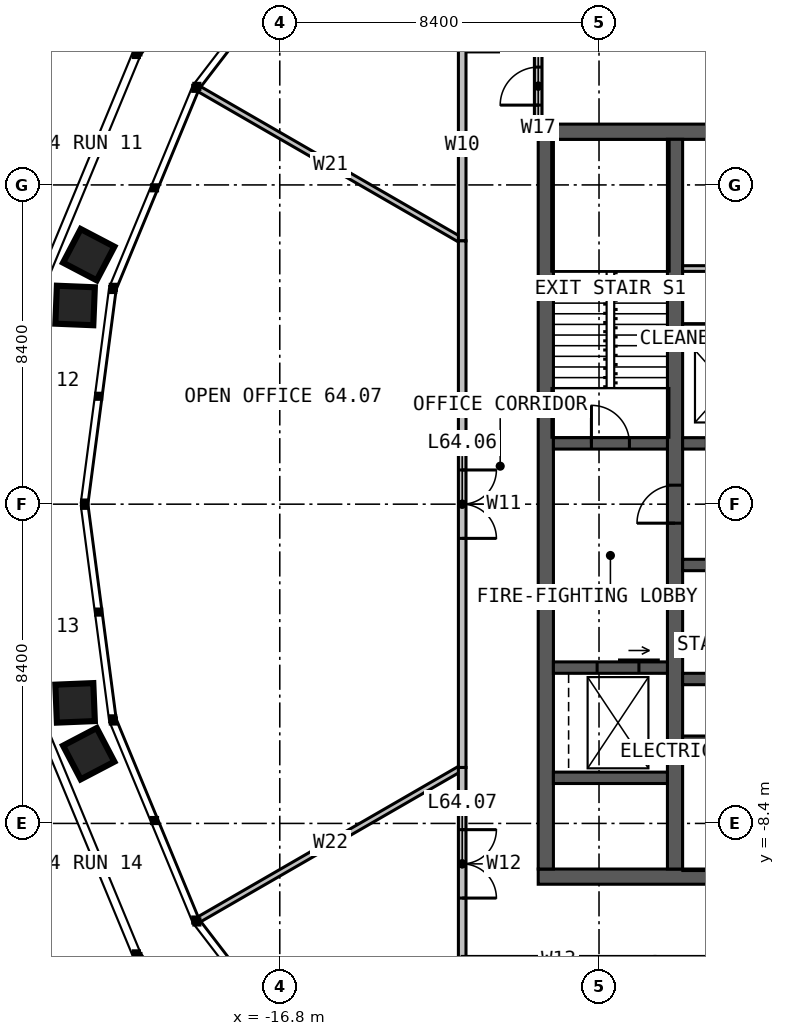
"""IFC4 building model, lengths in metres.
Left out: names, types, materials, properties, quantities, classifications, styles, units other than length and angle.
Written with IfcOpenShell. Run it as: python <this file> out.ifc"""

import sys

from ifc_helpers import new_model, si_unit, direction, frame, frame_2d, origin, place, context, subcontext, project, spatial, rectangle, extrude, element, fill, save


model = new_model("IFC4")
c1 = context("Model", 3, precision=1e-05, world=origin(), true_north=direction((0.0, 1.0)))
c2 = subcontext(c1, "Body", "Model", "MODEL_VIEW")
j1 = project(units=[si_unit("LENGTHUNIT", "METRE"), si_unit("PLANEANGLEUNIT", "RADIAN")], contexts=[c1])
p1 = place(None, origin())
s1 = spatial("IfcSite", under=j1, at=p1, CompositionType="ELEMENT")
p2 = place(p1, origin())
s2 = spatial("IfcBuilding", under=s1, at=p2, CompositionType="ELEMENT")
p3 = place(p2, frame((0.0, 0.0, 264.0)))
s3 = spatial("IfcBuildingStorey", under=s2, at=p3, CompositionType="ELEMENT", Elevation=264.0)
p4 = place(p3, frame((-10.0, 9.8, 0.0), z_axis=(0.0, 0.0, 1.0), x_axis=(1.0, 0.0, 0.0)))
e1 = element("IfcWall", 1, at=p4, inside=s3, PredefinedType="SOLIDWALL", context=c2, shape_type="SweptSolid", body=[
    extrude(rectangle(XDim=20.0, YDim=0.4, at=frame_2d((10.0, 0.0))), origin(), (0.0, 0.0, 1.0), 4.0),
])
p5 = place(p4, frame((9.4, 0.0, 0.0)))
e2 = element("IfcOpeningElement", 2, at=p5, cuts=e1, PredefinedType="OPENING", context=c2, shape_type="SweptSolid", body=[
    extrude(rectangle(XDim=1.2, YDim=2.2, at=frame_2d((0.6, 1.1))), frame((0.0, 0.21, 0.0), z_axis=(0.0, -1.0, 0.0), x_axis=(1.0, 0.0, 0.0)), (0.0, 0.0, 1.0), 0.42),
])
p6 = place(p3, frame((10.0, -9.8, 0.0), z_axis=(0.0, 0.0, 1.0), x_axis=(-1.0, 0.0, 0.0)))
e3 = element("IfcWall", 3, at=p6, inside=s3, PredefinedType="SOLIDWALL", context=c2, shape_type="SweptSolid", body=[
    extrude(rectangle(XDim=20.0, YDim=0.4, at=frame_2d((10.0, 0.0))), origin(), (0.0, 0.0, 1.0), 4.0),
])
p7 = place(p6, frame((6.875, 0.0, 0.0)))
e4 = element("IfcOpeningElement", 4, at=p7, cuts=e3, PredefinedType="OPENING", context=c2, shape_type="SweptSolid", body=[
    extrude(rectangle(XDim=1.2, YDim=2.2, at=frame_2d((0.6, 1.1))), frame((0.0, 0.21, 0.0), z_axis=(0.0, -1.0, 0.0), x_axis=(1.0, 0.0, 0.0)), (0.0, 0.0, 1.0), 0.42),
])
p8 = place(p3, frame((-9.8, 9.6, 0.0), z_axis=(0.0, 0.0, 1.0), x_axis=(0.0, -1.0, 0.0)))
e5 = element("IfcWall", 5, at=p8, inside=s3, PredefinedType="SOLIDWALL", context=c2, shape_type="SweptSolid", body=[
    extrude(rectangle(XDim=19.2, YDim=0.4, at=frame_2d((9.6, 0.0))), origin(), (0.0, 0.0, 1.0), 4.0),
])
p9 = place(p3, frame((-6.4, -9.6, 0.0), z_axis=(0.0, 0.0, 1.0), x_axis=(0.0, 1.0, 0.0)))
e6 = element("IfcWall", 6, at=p9, inside=s3, PredefinedType="SOLIDWALL", context=c2, shape_type="SweptSolid", body=[
    extrude(rectangle(XDim=19.2, YDim=0.4, at=frame_2d((9.6, 0.0))), origin(), (0.0, 0.0, 1.0), 4.0),
])
p10 = place(p9, frame((9.1, 0.0, 0.0)))
e7 = element("IfcOpeningElement", 7, at=p10, cuts=e6, PredefinedType="OPENING", context=c2, shape_type="SweptSolid", body=[
    extrude(rectangle(XDim=1.0, YDim=2.2, at=frame_2d((0.5, 1.1))), frame((0.0, 0.21, 0.0), z_axis=(0.0, -1.0, 0.0), x_axis=(1.0, 0.0, 0.0)), (0.0, 0.0, 1.0), 0.42),
])
p11 = place(p3, frame((-6.2, 1.6, 0.0), z_axis=(0.0, 0.0, 1.0), x_axis=(1.0, 0.0, 0.0)))
e8 = element("IfcWall", 8, at=p11, inside=s3, PredefinedType="SOLIDWALL", context=c2, shape_type="SweptSolid", body=[
    extrude(rectangle(XDim=4.85, YDim=0.3, at=frame_2d((2.425, 0.0))), origin(), (0.0, 0.0, 1.0), 4.0),
])
p12 = place(p11, frame((0.625, 0.0, 0.0)))
e9 = element("IfcOpeningElement", 9, at=p12, cuts=e8, PredefinedType="OPENING", context=c2, shape_type="SweptSolid", body=[
    extrude(rectangle(XDim=1.1, YDim=2.2, at=frame_2d((0.55, 1.1))), frame((0.0, 0.16, 0.0), z_axis=(0.0, -1.0, 0.0), x_axis=(1.0, 0.0, 0.0)), (0.0, 0.0, 1.0), 0.32),
])
p13 = place(p11, frame((3.15, 0.0, 0.0)))
e10 = element("IfcOpeningElement", 10, at=p13, cuts=e8, PredefinedType="OPENING", context=c2, shape_type="SweptSolid", body=[
    extrude(rectangle(XDim=1.1, YDim=2.2, at=frame_2d((0.55, 1.1))), frame((0.0, 0.16, 0.0), z_axis=(0.0, -1.0, 0.0), x_axis=(1.0, 0.0, 0.0)), (0.0, 0.0, 1.0), 0.32),
])
p14 = place(p3, frame((-6.2, 4.6, 0.0), z_axis=(0.0, 0.0, 1.0), x_axis=(1.0, 0.0, 0.0)))
e11 = element("IfcWall", 11, at=p14, inside=s3, PredefinedType="SOLIDWALL", context=c2, shape_type="SweptSolid", body=[
    extrude(rectangle(XDim=4.85, YDim=0.3, at=frame_2d((2.425, 0.0))), origin(), (0.0, 0.0, 1.0), 4.0),
])
p15 = place(p3, frame((-6.2, -1.6, 0.0), z_axis=(0.0, 0.0, 1.0), x_axis=(1.0, 0.0, 0.0)))
e12 = element("IfcWall", 12, at=p15, inside=s3, PredefinedType="SOLIDWALL", context=c2, shape_type="SweptSolid", body=[
    extrude(rectangle(XDim=7.4, YDim=0.3, at=frame_2d((3.7, 0.0))), origin(), (0.0, 0.0, 1.0), 4.0),
])
p16 = place(p15, frame((0.675, 0.0, 0.0)))
e13 = element("IfcOpeningElement", 13, at=p16, cuts=e12, PredefinedType="OPENING", context=c2, shape_type="SweptSolid", body=[
    extrude(rectangle(XDim=1.0, YDim=2.2, at=frame_2d((0.5, 1.1))), frame((0.0, 0.16, 0.0), z_axis=(0.0, -1.0, 0.0), x_axis=(1.0, 0.0, 0.0)), (0.0, 0.0, 1.0), 0.32),
])
p17 = place(p15, frame((2.225, 0.0, 0.0)))
e14 = element("IfcOpeningElement", 14, at=p17, cuts=e12, PredefinedType="OPENING", context=c2, shape_type="SweptSolid", body=[
    extrude(rectangle(XDim=1.0, YDim=2.2, at=frame_2d((0.5, 1.1))), frame((0.0, 0.16, 0.0), z_axis=(0.0, -1.0, 0.0), x_axis=(1.0, 0.0, 0.0)), (0.0, 0.0, 1.0), 0.32),
])
p18 = place(p15, frame((3.695, 0.0, 0.0)))
e15 = element("IfcOpeningElement", 15, at=p18, cuts=e12, PredefinedType="OPENING", context=c2, shape_type="SweptSolid", body=[
    extrude(rectangle(XDim=1.0, YDim=2.2, at=frame_2d((0.5, 1.1))), frame((0.0, 0.16, 0.0), z_axis=(0.0, -1.0, 0.0), x_axis=(1.0, 0.0, 0.0)), (0.0, 0.0, 1.0), 0.32),
])
p19 = place(p3, frame((-6.2, -4.6, 0.0), z_axis=(0.0, 0.0, 1.0), x_axis=(1.0, 0.0, 0.0)))
e16 = element("IfcWall", 16, at=p19, inside=s3, PredefinedType="SOLIDWALL", context=c2, shape_type="SweptSolid", body=[
    extrude(rectangle(XDim=7.4, YDim=0.3, at=frame_2d((3.7, 0.0))), origin(), (0.0, 0.0, 1.0), 4.0),
])
p20 = place(p3, frame((-6.2, -6.2, 0.0), z_axis=(0.0, 0.0, 1.0), x_axis=(1.0, 0.0, 0.0)))
e17 = element("IfcWall", 17, at=p20, inside=s3, PredefinedType="SOLIDWALL", context=c2, shape_type="SweptSolid", body=[
    extrude(rectangle(XDim=7.4, YDim=0.2, at=frame_2d((3.7, 0.0))), origin(), (0.0, 0.0, 1.0), 4.0),
])
p21 = place(p3, frame((-9.6, 1.6, 0.0), z_axis=(0.0, 0.0, 1.0), x_axis=(1.0, 0.0, 0.0)))
e18 = element("IfcWall", 18, at=p21, inside=s3, PredefinedType="SOLIDWALL", context=c2, shape_type="SweptSolid", body=[
    extrude(rectangle(XDim=3.0, YDim=0.3, at=frame_2d((1.5, 0.0))), origin(), (0.0, 0.0, 1.0), 4.0),
])
p22 = place(p21, frame((1.0, 0.0, 0.0)))
e19 = element("IfcOpeningElement", 19, at=p22, cuts=e18, PredefinedType="OPENING", context=c2, shape_type="SweptSolid", body=[
    extrude(rectangle(XDim=1.0, YDim=2.2, at=frame_2d((0.5, 1.1))), frame((0.0, 0.16, 0.0), z_axis=(0.0, -1.0, 0.0), x_axis=(1.0, 0.0, 0.0)), (0.0, 0.0, 1.0), 0.32),
])
p23 = place(p3, frame((-9.6, -4.3, 0.0), z_axis=(0.0, 0.0, 1.0), x_axis=(1.0, 0.0, 0.0)))
e20 = element("IfcWall", 20, at=p23, inside=s3, PredefinedType="SOLIDWALL", context=c2, shape_type="SweptSolid", body=[
    extrude(rectangle(XDim=3.0, YDim=0.3, at=frame_2d((1.5, 0.0))), origin(), (0.0, 0.0, 1.0), 4.0),
])
p24 = place(p23, frame((1.15, 0.0, 0.0)))
e21 = element("IfcOpeningElement", 21, at=p24, cuts=e20, PredefinedType="OPENING", context=c2, shape_type="SweptSolid", body=[
    extrude(rectangle(XDim=1.1, YDim=2.2, at=frame_2d((0.55, 1.1))), frame((0.0, 0.16, 0.0), z_axis=(0.0, -1.0, 0.0), x_axis=(1.0, 0.0, 0.0)), (0.0, 0.0, 1.0), 0.32),
])
p25 = place(p3, frame((-9.6, -7.2, 0.0), z_axis=(0.0, 0.0, 1.0), x_axis=(1.0, 0.0, 0.0)))
e22 = element("IfcWall", 22, at=p25, inside=s3, PredefinedType="SOLIDWALL", context=c2, shape_type="SweptSolid", body=[
    extrude(rectangle(XDim=3.0, YDim=0.3, at=frame_2d((1.5, 0.0))), origin(), (0.0, 0.0, 1.0), 4.0),
])
p26 = place(p3, frame((-6.2, 6.2, 0.0), z_axis=(0.0, 0.0, 1.0), x_axis=(1.0, 0.0, 0.0)))
e23 = element("IfcWall", 23, at=p26, inside=s3, PredefinedType="PARTITIONING", context=c2, shape_type="SweptSolid", body=[
    extrude(rectangle(XDim=4.85, YDim=0.15, at=frame_2d((2.425, 0.0))), origin(), (0.0, 0.0, 1.0), 3.75),
])
p27 = place(p26, frame((3.15, 0.0, 0.0)))
e24 = element("IfcOpeningElement", 24, at=p27, cuts=e23, PredefinedType="OPENING", context=c2, shape_type="SweptSolid", body=[
    extrude(rectangle(XDim=1.0, YDim=2.2, at=frame_2d((0.5, 1.1))), frame((0.0, 0.085, 0.0), z_axis=(0.0, -1.0, 0.0), x_axis=(1.0, 0.0, 0.0)), (0.0, 0.0, 1.0), 0.17),
])
p28 = place(p26, frame((0.75, 0.0, 0.0)))
e25 = element("IfcOpeningElement", 25, at=p28, cuts=e23, PredefinedType="OPENING", context=c2, shape_type="SweptSolid", body=[
    extrude(rectangle(XDim=0.9, YDim=2.2, at=frame_2d((0.45, 1.1))), frame((0.0, 0.085, 0.0), z_axis=(0.0, -1.0, 0.0), x_axis=(1.0, 0.0, 0.0)), (0.0, 0.0, 1.0), 0.17),
])
for number, where, z_axis, x_axis in (
    (26, (-12.0, 6.928, 0.0), (0.0, 0.0, 1.0), (-0.866, 0.5, 0.0)),
    (27, (-12.0, -6.928, 0.0), (0.0, 0.0, 1.0), (-0.866, -0.5, 0.0)),
):
    element("IfcWall", number, at=place(p3, frame(where, z_axis=z_axis, x_axis=x_axis)), inside=s3, PredefinedType="PARTITIONING", context=c2, shape_type="SweptSolid", body=[
        extrude(rectangle(XDim=7.992, YDim=0.15, at=frame_2d((3.996, 0.0))), origin(), (0.0, 0.0, 1.0), 2.79),
    ])
p29 = place(p3, frame((-12.0, 12.0, 0.0), z_axis=(0.0, 0.0, 1.0), x_axis=(0.0, -1.0, 0.0)))
e28 = element("IfcWall", 28, at=p29, inside=s3, PredefinedType="PARTITIONING", context=c2, shape_type="SweptSolid", body=[
    extrude(rectangle(XDim=5.072, YDim=0.2, at=frame_2d((2.536, 0.0))), origin(), (0.0, 0.0, 1.0), 3.8),
])
p30 = place(p3, frame((-12.0, 6.928, 0.0), z_axis=(0.0, 0.0, 1.0), x_axis=(0.0, -1.0, 0.0)))
e29 = element("IfcWall", 29, at=p30, inside=s3, PredefinedType="PARTITIONING", context=c2, shape_type="SweptSolid", body=[
    extrude(rectangle(XDim=13.856, YDim=0.2, at=frame_2d((6.928, 0.0))), origin(), (0.0, 0.0, 1.0), 3.8),
])
p31 = place(p30, frame((6.028, 0.0, 0.0)))
e30 = element("IfcOpeningElement", 30, at=p31, cuts=e29, PredefinedType="OPENING", context=c2, shape_type="SweptSolid", body=[
    extrude(rectangle(XDim=1.8, YDim=2.2, at=frame_2d((0.9, 1.1))), frame((0.0, 0.11, 0.0), z_axis=(0.0, -1.0, 0.0), x_axis=(1.0, 0.0, 0.0)), (0.0, 0.0, 1.0), 0.22),
])
p32 = place(p3, frame((-12.0, -6.928, 0.0), z_axis=(0.0, 0.0, 1.0), x_axis=(0.0, -1.0, 0.0)))
e31 = element("IfcWall", 31, at=p32, inside=s3, PredefinedType="PARTITIONING", context=c2, shape_type="SweptSolid", body=[
    extrude(rectangle(XDim=5.072, YDim=0.2, at=frame_2d((2.536, 0.0))), origin(), (0.0, 0.0, 1.0), 3.8),
])
p33 = place(p32, frame((1.636, 0.0, 0.0)))
e32 = element("IfcOpeningElement", 32, at=p33, cuts=e31, PredefinedType="OPENING", context=c2, shape_type="SweptSolid", body=[
    extrude(rectangle(XDim=1.8, YDim=2.2, at=frame_2d((0.9, 1.1))), frame((0.0, 0.11, 0.0), z_axis=(0.0, -1.0, 0.0), x_axis=(1.0, 0.0, 0.0)), (0.0, 0.0, 1.0), 0.22),
])
p34 = place(p3, frame((-10.0, 10.0, 0.0), z_axis=(0.0, 0.0, 1.0), x_axis=(0.0, 1.0, 0.0)))
e33 = element("IfcWall", 33, at=p34, inside=s3, PredefinedType="PARTITIONING", context=c2, shape_type="SweptSolid", body=[
    extrude(rectangle(XDim=2.0, YDim=0.2, at=frame_2d((1.0, 0.0))), origin(), (0.0, 0.0, 1.0), 3.8),
])
p35 = place(p34, frame((0.5, 0.0, 0.0)))
e34 = element("IfcOpeningElement", 34, at=p35, cuts=e33, PredefinedType="OPENING", context=c2, shape_type="SweptSolid", body=[
    extrude(rectangle(XDim=1.0, YDim=2.2, at=frame_2d((0.5, 1.1))), frame((0.0, 0.11, 0.0), z_axis=(0.0, -1.0, 0.0), x_axis=(1.0, 0.0, 0.0)), (0.0, 0.0, 1.0), 0.22),
])
p36 = place(p10, origin())
e35 = element("IfcDoor", 35, at=p36, inside=s3, OperationType="SINGLE_SWING_LEFT", PredefinedType="DOOR", context=c2, shape_type="SweptSolid", body=[
    extrude(rectangle(XDim=1.0, YDim=2.2, at=frame_2d((0.5, 1.1))), frame((0.0, 0.025, 0.0), z_axis=(0.0, -1.0, 0.0), x_axis=(1.0, 0.0, 0.0)), (0.0, 0.0, 1.0), 0.05),
])
fill(e7, e35)
p37 = place(p22, origin())
e36 = element("IfcDoor", 36, at=p37, inside=s3, OperationType="SINGLE_SWING_LEFT", PredefinedType="DOOR", context=c2, shape_type="SweptSolid", body=[
    extrude(rectangle(XDim=1.0, YDim=2.2, at=frame_2d((0.5, 1.1))), frame((0.0, 0.025, 0.0), z_axis=(0.0, -1.0, 0.0), x_axis=(1.0, 0.0, 0.0)), (0.0, 0.0, 1.0), 0.05),
])
fill(e19, e36)
p38 = place(p24, origin())
e37 = element("IfcDoor", 37, at=p38, inside=s3, OperationType="SLIDING_TO_LEFT", PredefinedType="DOOR", context=c2, shape_type="SweptSolid", body=[
    extrude(rectangle(XDim=1.1, YDim=2.2, at=frame_2d((0.55, 1.1))), frame((0.0, 0.025, 0.0), z_axis=(0.0, -1.0, 0.0), x_axis=(1.0, 0.0, 0.0)), (0.0, 0.0, 1.0), 0.05),
])
fill(e21, e37)
p39 = place(p31, origin())
e38 = element("IfcDoor", 38, at=p39, inside=s3, OperationType="DOUBLE_DOOR_SINGLE_SWING", PredefinedType="DOOR", context=c2, shape_type="SweptSolid", body=[
    extrude(rectangle(XDim=1.8, YDim=2.2, at=frame_2d((0.9, 1.1))), frame((0.0, 0.025, 0.0), z_axis=(0.0, -1.0, 0.0), x_axis=(1.0, 0.0, 0.0)), (0.0, 0.0, 1.0), 0.05),
])
fill(e30, e38)
p40 = place(p33, origin())
e39 = element("IfcDoor", 39, at=p40, inside=s3, OperationType="DOUBLE_DOOR_SINGLE_SWING", PredefinedType="DOOR", context=c2, shape_type="SweptSolid", body=[
    extrude(rectangle(XDim=1.8, YDim=2.2, at=frame_2d((0.9, 1.1))), frame((0.0, 0.025, 0.0), z_axis=(0.0, -1.0, 0.0), x_axis=(1.0, 0.0, 0.0)), (0.0, 0.0, 1.0), 0.05),
])
fill(e32, e39)
p41 = place(p35, origin())
e40 = element("IfcDoor", 40, at=p41, inside=s3, OperationType="SINGLE_SWING_LEFT", PredefinedType="DOOR", context=c2, shape_type="SweptSolid", body=[
    extrude(rectangle(XDim=1.0, YDim=2.2, at=frame_2d((0.5, 1.1))), frame((0.0, 0.025, 0.0), z_axis=(0.0, -1.0, 0.0), x_axis=(1.0, 0.0, 0.0)), (0.0, 0.0, 1.0), 0.05),
])
fill(e34, e40)
save(model, sys.argv[1])
